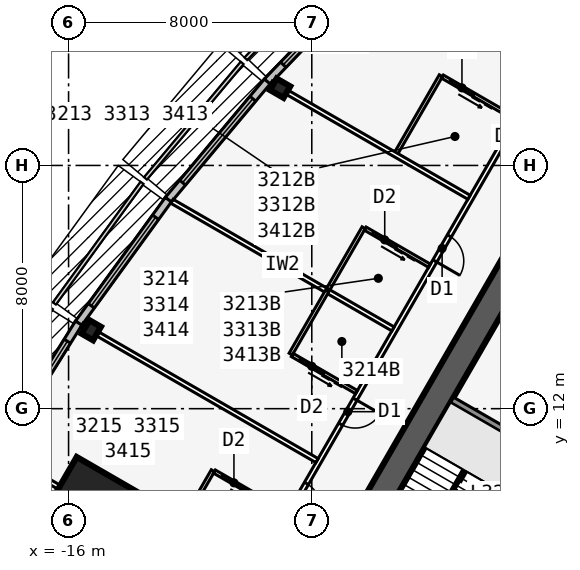
"""IFC4 building model, lengths in metres.
Left out: names, types, materials, properties, quantities, classifications, styles, units other than length and angle.
Written with IfcOpenShell. Run it as: python <this file> out.ifc"""

import sys

from ifc_helpers import new_model, si_unit, direction, frame, frame_2d, origin, origin_2d, place, context, subcontext, project, spatial, rectangle, i_section, extrude, element, fill, save


model = new_model("IFC4")
c1 = context("Model", 3, precision=1e-05, world=origin(), true_north=direction((0.0, 1.0)))
c2 = subcontext(c1, "Body", "Model", "MODEL_VIEW")
j1 = project(units=[si_unit("LENGTHUNIT", "METRE"), si_unit("PLANEANGLEUNIT", "RADIAN")], contexts=[c1])
p1 = place(None, origin())
s1 = spatial("IfcSite", under=j1, at=p1, CompositionType="ELEMENT")
p2 = place(p1, origin())
s2 = spatial("IfcBuilding", under=s1, at=p2, CompositionType="ELEMENT")
p3 = place(p2, frame((0.0, 0.0, 124.9)))
s3 = spatial("IfcBuildingStorey", under=s2, at=p3, CompositionType="ELEMENT", Elevation=124.9)
p4 = place(p3, frame((0.0, 19.052, 0.0), z_axis=(0.0, 0.0, 1.0), x_axis=(-0.499999749417, -0.866025548458, 0.0)))
e1 = element("IfcWall", 1, at=p4, inside=s3, PredefinedType="SHEAR", context=c2, shape_type="SweptSolid", body=[
    extrude(rectangle(XDim=33.0, YDim=0.9, at=frame_2d((16.5, 0.0))), origin(), (0.0, 0.0, 1.0), 3.4),
])
p5 = place(p4, frame((14.15, 0.0, 0.0)))
e2 = element("IfcOpeningElement", 2, at=p5, cuts=e1, PredefinedType="OPENING", context=c2, shape_type="SweptSolid", body=[
    extrude(rectangle(XDim=1.8, YDim=2.13, at=frame_2d((0.9, 1.065))), frame((0.0, 0.46, 0.0), z_axis=(0.0, -1.0, 0.0), x_axis=(1.0, 0.0, 0.0)), (0.0, 0.0, 1.0), 0.92),
])
p6 = place(p4, frame((12.6, 0.0, 0.0)))
e3 = element("IfcOpeningElement", 3, at=p6, cuts=e1, PredefinedType="OPENING", context=c2, shape_type="SweptSolid", body=[
    extrude(rectangle(XDim=1.0, YDim=2.13, at=frame_2d((0.5, 1.065))), frame((0.0, 0.46, 0.0), z_axis=(0.0, -1.0, 0.0), x_axis=(1.0, 0.0, 0.0)), (0.0, 0.0, 1.0), 0.92),
])
p7 = place(p3, frame((-0.062, 11.794, 0.0), z_axis=(0.0, 0.0, 1.0), x_axis=(-0.500006680225, -0.86602154692, 0.0)))
e4 = element("IfcWall", 4, at=p7, inside=s3, PredefinedType="SOLIDWALL", context=c2, shape_type="SweptSolid", body=[
    extrude(rectangle(XDim=7.733, YDim=0.25, at=frame_2d((3.866, 0.0))), origin(), (0.0, 0.0, 1.0), 3.235),
])
p8 = place(p3, frame((-0.679, 10.727, 0.0), z_axis=(0.0, 0.0, 1.0), x_axis=(-0.866022959057, 0.500004234368, 0.0)))
e5 = element("IfcWall", 5, at=p8, inside=s3, PredefinedType="SOLIDWALL", context=c2, shape_type="SweptSolid", body=[
    extrude(rectangle(XDim=3.125, YDim=0.2, at=frame_2d((1.562, 0.0))), origin(), (0.0, 0.0, 1.0), 3.235),
])
for number, where, z_axis, x_axis in (
    (6, (-9.041, 22.541, 0.0), (0.0, 0.0, 1.0), (-0.5, -0.866, 0.0)),
    (7, (-15.254, 14.58, 0.0), (0.0, 0.0, 1.0), (-0.866, 0.5, 0.0)),
):
    element("IfcColumn", number, at=place(p3, frame(where, z_axis=z_axis, x_axis=x_axis)), inside=s3, PredefinedType="COLUMN", context=c2, shape_type="SweptSolid", body=[
        extrude(i_section(OverallWidth=0.437, OverallDepth=0.513, WebThickness=0.061, FlangeThickness=0.097, at=origin_2d()), origin(), (0.0, 0.0, 1.0), 3.4),
    ])
p9 = place(p3, frame((-15.312, 8.84, 0.0), z_axis=(0.0, 0.0, 1.0), x_axis=(-0.866025403784, 0.5, 0.0)))
e8 = element("IfcColumn", 8, at=p9, inside=s3, PredefinedType="COLUMN", context=c2, shape_type="SweptSolid", body=[
    extrude(rectangle(XDim=2.3, YDim=2.3, at=origin_2d()), origin(), (0.0, 0.0, 1.0), 3.4),
])
p10 = place(p3, frame((-5.91, 26.472, 0.0), z_axis=(0.0, 0.0, 1.0), x_axis=(-0.691719937936, -0.722165858693, 0.0)))
e9 = element("IfcWall", 9, at=p10, inside=s3, PredefinedType="STANDARD", context=c2, shape_type="SweptSolid", body=[
    extrude(rectangle(XDim=5.148, YDim=0.25, at=frame_2d((2.574, 0.0))), origin(), (0.0, 0.0, 1.0), 3.235),
])
p11 = place(p10, frame((0.774, 0.0, 0.45)))
e10 = element("IfcOpeningElement", 10, at=p11, cuts=e9, PredefinedType="OPENING", context=c2, shape_type="SweptSolid", body=[
    extrude(rectangle(XDim=3.6, YDim=2.4, at=frame_2d((1.8, 1.2))), frame((0.0, 0.135, 0.0), z_axis=(0.0, -1.0, 0.0), x_axis=(1.0, 0.0, 0.0)), (0.0, 0.0, 1.0), 0.27),
])
p12 = place(p3, frame((-9.465, 22.76, 0.0), z_axis=(0.0, 0.0, 1.0), x_axis=(-0.641810386606, -0.766863369607, 0.0)))
e11 = element("IfcWall", 11, at=p12, inside=s3, PredefinedType="STANDARD", context=c2, shape_type="SweptSolid", body=[
    extrude(rectangle(XDim=5.076, YDim=0.25, at=frame_2d((2.538, 0.0))), origin(), (0.0, 0.0, 1.0), 3.235),
])
p13 = place(p12, frame((0.738, 0.0, 0.45)))
e12 = element("IfcOpeningElement", 12, at=p13, cuts=e11, PredefinedType="OPENING", context=c2, shape_type="SweptSolid", body=[
    extrude(rectangle(XDim=3.6, YDim=2.4, at=frame_2d((1.8, 1.2))), frame((0.0, 0.135, 0.0), z_axis=(0.0, -1.0, 0.0), x_axis=(1.0, 0.0, 0.0)), (0.0, 0.0, 1.0), 0.27),
])
p14 = place(p3, frame((-12.718, 18.875, 0.0), z_axis=(0.0, 0.0, 1.0), x_axis=(-0.587669188412, -0.809101307001, 0.0)))
e13 = element("IfcWall", 13, at=p14, inside=s3, PredefinedType="STANDARD", context=c2, shape_type="SweptSolid", body=[
    extrude(rectangle(XDim=5.028, YDim=0.25, at=frame_2d((2.514, 0.0))), origin(), (0.0, 0.0, 1.0), 3.235),
])
p15 = place(p14, frame((0.714, 0.0, 0.45)))
e14 = element("IfcOpeningElement", 14, at=p15, cuts=e13, PredefinedType="OPENING", context=c2, shape_type="SweptSolid", body=[
    extrude(rectangle(XDim=3.6, YDim=2.4, at=frame_2d((1.8, 1.2))), frame((0.0, 0.135, 0.0), z_axis=(0.0, -1.0, 0.0), x_axis=(1.0, 0.0, 0.0)), (0.0, 0.0, 1.0), 0.27),
])
p16 = place(p3, frame((-15.667, 14.814, 0.0), z_axis=(0.0, 0.0, 1.0), x_axis=(-0.529990167382, -0.84800378683, 0.0)))
e15 = element("IfcWall", 15, at=p16, inside=s3, PredefinedType="STANDARD", context=c2, shape_type="SweptSolid", body=[
    extrude(rectangle(XDim=5.003, YDim=0.25, at=frame_2d((2.501, 0.0))), origin(), (0.0, 0.0, 1.0), 3.235),
])
p17 = place(p16, frame((0.701, 0.0, 0.45)))
e16 = element("IfcOpeningElement", 16, at=p17, cuts=e15, PredefinedType="OPENING", context=c2, shape_type="SweptSolid", body=[
    extrude(rectangle(XDim=3.6, YDim=2.4, at=frame_2d((1.8, 1.2))), frame((0.0, 0.135, 0.0), z_axis=(0.0, -1.0, 0.0), x_axis=(1.0, 0.0, 0.0)), (0.0, 0.0, 1.0), 0.27),
])
p18 = place(p3, frame((-0.5, 22.836, 0.0), z_axis=(0.0, 0.0, 1.0), x_axis=(-0.500001677587, -0.866024435227, 0.0)))
e17 = element("IfcWall", 17, at=p18, inside=s3, PredefinedType="PARTITIONING", context=c2, shape_type="SweptSolid", body=[
    extrude(rectangle(XDim=39.054, YDim=0.15, at=frame_2d((19.527, 0.0))), origin(), (0.0, 0.0, 1.0), 3.235),
])
p19 = place(p18, frame((0.352, 0.0, 0.0)))
e18 = element("IfcOpeningElement", 18, at=p19, cuts=e17, PredefinedType="OPENING", context=c2, shape_type="SweptSolid", body=[
    extrude(rectangle(XDim=0.95, YDim=2.13, at=frame_2d((0.475, 1.065))), frame((0.0, 0.085, 0.0), z_axis=(0.0, -1.0, 0.0), x_axis=(1.0, 0.0, 0.0)), (0.0, 0.0, 1.0), 0.17),
])
p20 = place(p18, frame((5.952, 0.0, 0.0)))
e19 = element("IfcOpeningElement", 19, at=p20, cuts=e17, PredefinedType="OPENING", context=c2, shape_type="SweptSolid", body=[
    extrude(rectangle(XDim=0.95, YDim=2.13, at=frame_2d((0.475, 1.065))), frame((0.0, 0.085, 0.0), z_axis=(0.0, -1.0, 0.0), x_axis=(1.0, 0.0, 0.0)), (0.0, 0.0, 1.0), 0.17),
])
p21 = place(p18, frame((12.152, 0.0, 0.0)))
e20 = element("IfcOpeningElement", 20, at=p21, cuts=e17, PredefinedType="OPENING", context=c2, shape_type="SweptSolid", body=[
    extrude(rectangle(XDim=0.95, YDim=2.13, at=frame_2d((0.475, 1.065))), frame((0.0, 0.085, 0.0), z_axis=(0.0, -1.0, 0.0), x_axis=(1.0, 0.0, 0.0)), (0.0, 0.0, 1.0), 0.17),
])
p22 = place(p18, frame((15.352, 0.0, 0.0)))
e21 = element("IfcOpeningElement", 21, at=p22, cuts=e17, PredefinedType="OPENING", context=c2, shape_type="SweptSolid", body=[
    extrude(rectangle(XDim=0.95, YDim=2.13, at=frame_2d((0.475, 1.065))), frame((0.0, 0.085, 0.0), z_axis=(0.0, -1.0, 0.0), x_axis=(1.0, 0.0, 0.0)), (0.0, 0.0, 1.0), 0.17),
])
p23 = place(p18, frame((22.152, 0.0, 0.0)))
e22 = element("IfcOpeningElement", 22, at=p23, cuts=e17, PredefinedType="OPENING", context=c2, shape_type="SweptSolid", body=[
    extrude(rectangle(XDim=0.95, YDim=2.13, at=frame_2d((0.475, 1.065))), frame((0.0, 0.085, 0.0), z_axis=(0.0, -1.0, 0.0), x_axis=(1.0, 0.0, 0.0)), (0.0, 0.0, 1.0), 0.17),
])
p24 = place(p18, frame((30.352, 0.0, 0.0)))
e23 = element("IfcOpeningElement", 23, at=p24, cuts=e17, PredefinedType="OPENING", context=c2, shape_type="SweptSolid", body=[
    extrude(rectangle(XDim=0.95, YDim=2.13, at=frame_2d((0.475, 1.065))), frame((0.0, 0.085, 0.0), z_axis=(0.0, -1.0, 0.0), x_axis=(1.0, 0.0, 0.0)), (0.0, 0.0, 1.0), 0.17),
])
p25 = place(p18, frame((37.752, 0.0, 0.0)))
e24 = element("IfcOpeningElement", 24, at=p25, cuts=e17, PredefinedType="OPENING", context=c2, shape_type="SweptSolid", body=[
    extrude(rectangle(XDim=0.95, YDim=2.13, at=frame_2d((0.475, 1.065))), frame((0.0, 0.085, 0.0), z_axis=(0.0, -1.0, 0.0), x_axis=(1.0, 0.0, 0.0)), (0.0, 0.0, 1.0), 0.17),
])
p26 = place(p3, frame((-2.829, 18.954, 0.0), z_axis=(0.0, 0.0, 1.0), x_axis=(-0.866015739374, 0.500016738876, 0.0)))
e25 = element("IfcWall", 25, at=p26, inside=s3, PredefinedType="PARTITIONING", context=c2, shape_type="SweptSolid", body=[
    extrude(rectangle(XDim=7.516, YDim=0.15, at=frame_2d((3.758, 0.0))), origin(), (0.0, 0.0, 1.0), 2.389),
])
p27 = place(p3, frame((-5.329, 14.623, 0.0), z_axis=(0.0, 0.0, 1.0), x_axis=(-0.866011723728, 0.500023693804, 0.0)))
e26 = element("IfcWall", 26, at=p27, inside=s3, PredefinedType="PARTITIONING", context=c2, shape_type="SweptSolid", body=[
    extrude(rectangle(XDim=8.395, YDim=0.15, at=frame_2d((4.198, 0.0))), origin(), (0.0, 0.0, 1.0), 2.389),
])
p28 = place(p3, frame((-7.829, 10.293, 0.0), z_axis=(0.0, 0.0, 1.0), x_axis=(-0.866027015393, 0.499997208602, 0.0)))
e27 = element("IfcWall", 27, at=p28, inside=s3, PredefinedType="PARTITIONING", context=c2, shape_type="SweptSolid", body=[
    extrude(rectangle(XDim=8.922, YDim=0.15, at=frame_2d((4.461, 0.0))), origin(), (0.0, 0.0, 1.0), 2.389),
])
p29 = place(p3, frame((-10.329, 5.963, 0.0), z_axis=(0.0, 0.0, 1.0), x_axis=(-0.866025170687, 0.500000403736, 0.0)))
e28 = element("IfcWall", 28, at=p29, inside=s3, PredefinedType="PARTITIONING", context=c2, shape_type="SweptSolid", body=[
    extrude(rectangle(XDim=9.099, YDim=0.15, at=frame_2d((4.549, 0.0))), origin(), (0.0, 0.0, 1.0), 2.389),
])
p30 = place(p3, frame((-3.753, 22.952, 0.0), z_axis=(0.0, 0.0, 1.0), x_axis=(-0.499990139034, -0.866031096941, 0.0)))
e29 = element("IfcWall", 29, at=p30, inside=s3, PredefinedType="PLUMBINGWALL", context=c2, shape_type="SweptSolid", body=[
    extrude(rectangle(XDim=3.0, YDim=0.12, at=frame_2d((1.5, 0.0))), origin(), (0.0, 0.0, 1.0), 3.235),
])
p31 = place(p3, frame((-1.329, 21.552, 0.0), z_axis=(0.0, 0.0, 1.0), x_axis=(-0.865997131366, 0.500048966069, 0.0)))
e30 = element("IfcWall", 30, at=p31, inside=s3, PredefinedType="PLUMBINGWALL", context=c2, shape_type="SweptSolid", body=[
    extrude(rectangle(XDim=2.74, YDim=0.12, at=frame_2d((1.37, 0.0))), origin(), (0.0, 0.0, 1.0), 3.235),
])
p32 = place(p31, frame((1.55, 0.0, 0.0)))
e31 = element("IfcOpeningElement", 31, at=p32, cuts=e30, PredefinedType="OPENING", context=c2, shape_type="SweptSolid", body=[
    extrude(rectangle(XDim=0.9, YDim=2.13, at=frame_2d((0.45, 1.065))), frame((0.0, 0.07, 0.0), z_axis=(0.0, -1.0, 0.0), x_axis=(1.0, 0.0, 0.0)), (0.0, 0.0, 1.0), 0.14),
])
p33 = place(p3, frame((-6.293, 17.952, 0.0), z_axis=(0.0, 0.0, 1.0), x_axis=(-0.499957262057, -0.866050077142, 0.0)))
e32 = element("IfcWall", 32, at=p33, inside=s3, PredefinedType="PLUMBINGWALL", context=c2, shape_type="SweptSolid", body=[
    extrude(rectangle(XDim=2.4, YDim=0.12, at=frame_2d((1.2, 0.0))), origin(), (0.0, 0.0, 1.0), 3.235),
])
p34 = place(p3, frame((-4.128, 16.702, 0.0), z_axis=(0.0, 0.0, 1.0), x_axis=(-0.866048967903, 0.499959183527, 0.0)))
e33 = element("IfcWall", 33, at=p34, inside=s3, PredefinedType="PLUMBINGWALL", context=c2, shape_type="SweptSolid", body=[
    extrude(rectangle(XDim=2.44, YDim=0.12, at=frame_2d((1.22, 0.0))), origin(), (0.0, 0.0, 1.0), 3.235),
])
p35 = place(p34, frame((1.25, 0.0, 0.0)))
e34 = element("IfcOpeningElement", 34, at=p35, cuts=e33, PredefinedType="OPENING", context=c2, shape_type="SweptSolid", body=[
    extrude(rectangle(XDim=0.9, YDim=2.13, at=frame_2d((0.45, 1.065))), frame((0.0, 0.07, 0.0), z_axis=(0.0, -1.0, 0.0), x_axis=(1.0, 0.0, 0.0)), (0.0, 0.0, 1.0), 0.14),
])
p36 = place(p3, frame((-7.493, 15.873, 0.0), z_axis=(0.0, 0.0, 1.0), x_axis=(-0.500077600433, -0.865980596518, 0.0)))
e35 = element("IfcWall", 35, at=p36, inside=s3, PredefinedType="PLUMBINGWALL", context=c2, shape_type="SweptSolid", body=[
    extrude(rectangle(XDim=2.4, YDim=0.12, at=frame_2d((1.2, 0.0))), origin(), (0.0, 0.0, 1.0), 3.235),
])
p37 = place(p3, frame((-6.529, 12.545, 0.0), z_axis=(0.0, 0.0, 1.0), x_axis=(-0.866023955769, 0.500002508028, 0.0)))
e36 = element("IfcWall", 36, at=p37, inside=s3, PredefinedType="PLUMBINGWALL", context=c2, shape_type="SweptSolid", body=[
    extrude(rectangle(XDim=2.44, YDim=0.12, at=frame_2d((1.22, 0.0))), origin(), (0.0, 0.0, 1.0), 3.235),
])
p38 = place(p37, frame((1.25, 0.0, 0.0)))
e37 = element("IfcOpeningElement", 37, at=p38, cuts=e36, PredefinedType="OPENING", context=c2, shape_type="SweptSolid", body=[
    extrude(rectangle(XDim=0.9, YDim=2.13, at=frame_2d((0.45, 1.065))), frame((0.0, 0.07, 0.0), z_axis=(0.0, -1.0, 0.0), x_axis=(1.0, 0.0, 0.0)), (0.0, 0.0, 1.0), 0.14),
])
p39 = place(p3, frame((-11.253, 9.961, 0.0), z_axis=(0.0, 0.0, 1.0), x_axis=(-0.499990139034, -0.866031096941, 0.0)))
e38 = element("IfcWall", 38, at=p39, inside=s3, PredefinedType="PLUMBINGWALL", context=c2, shape_type="SweptSolid", body=[
    extrude(rectangle(XDim=3.0, YDim=0.12, at=frame_2d((1.5, 0.0))), origin(), (0.0, 0.0, 1.0), 3.235),
])
p40 = place(p3, frame((-8.829, 8.561, 0.0), z_axis=(0.0, 0.0, 1.0), x_axis=(-0.866035715982, 0.499982138324, 0.0)))
e39 = element("IfcWall", 39, at=p40, inside=s3, PredefinedType="PLUMBINGWALL", context=c2, shape_type="SweptSolid", body=[
    extrude(rectangle(XDim=2.74, YDim=0.12, at=frame_2d((1.37, 0.0))), origin(), (0.0, 0.0, 1.0), 3.235),
])
p41 = place(p40, frame((1.55, 0.0, 0.0)))
e40 = element("IfcOpeningElement", 40, at=p41, cuts=e39, PredefinedType="OPENING", context=c2, shape_type="SweptSolid", body=[
    extrude(rectangle(XDim=0.9, YDim=2.13, at=frame_2d((0.45, 1.065))), frame((0.0, 0.07, 0.0), z_axis=(0.0, -1.0, 0.0), x_axis=(1.0, 0.0, 0.0)), (0.0, 0.0, 1.0), 0.14),
])
p42 = place(p3, frame((-2.988, 9.978, 0.0), z_axis=(0.0, 0.0, 1.0), x_axis=(-0.499992232847, -0.866029888106, 0.0)))
e41 = element("IfcWall", 41, at=p42, inside=s3, PredefinedType="SOLIDWALL", context=c2, shape_type="SweptSolid", body=[
    extrude(rectangle(XDim=2.794, YDim=0.1, at=frame_2d((1.397, 0.0))), origin(), (0.0, 0.0, 1.0), 3.4),
])
p43 = place(p11, origin())
e42 = element("IfcWindow", 42, at=p43, inside=s3, PartitioningType="SINGLE_PANEL", PredefinedType="WINDOW", context=c2, shape_type="SweptSolid", body=[
    extrude(rectangle(XDim=3.6, YDim=2.4, at=frame_2d((1.8, 1.2))), frame((0.0, 0.03, 0.0), z_axis=(0.0, -1.0, 0.0), x_axis=(1.0, 0.0, 0.0)), (0.0, 0.0, 1.0), 0.06),
])
fill(e10, e42)
p44 = place(p13, origin())
e43 = element("IfcWindow", 43, at=p44, inside=s3, PartitioningType="SINGLE_PANEL", PredefinedType="WINDOW", context=c2, shape_type="SweptSolid", body=[
    extrude(rectangle(XDim=3.6, YDim=2.4, at=frame_2d((1.8, 1.2))), frame((0.0, 0.03, 0.0), z_axis=(0.0, -1.0, 0.0), x_axis=(1.0, 0.0, 0.0)), (0.0, 0.0, 1.0), 0.06),
])
fill(e12, e43)
p45 = place(p15, origin())
e44 = element("IfcWindow", 44, at=p45, inside=s3, PartitioningType="SINGLE_PANEL", PredefinedType="WINDOW", context=c2, shape_type="SweptSolid", body=[
    extrude(rectangle(XDim=3.6, YDim=2.4, at=frame_2d((1.8, 1.2))), frame((0.0, 0.03, 0.0), z_axis=(0.0, -1.0, 0.0), x_axis=(1.0, 0.0, 0.0)), (0.0, 0.0, 1.0), 0.06),
])
fill(e14, e44)
p46 = place(p17, origin())
e45 = element("IfcWindow", 45, at=p46, inside=s3, PartitioningType="SINGLE_PANEL", PredefinedType="WINDOW", context=c2, shape_type="SweptSolid", body=[
    extrude(rectangle(XDim=3.6, YDim=2.4, at=frame_2d((1.8, 1.2))), frame((0.0, 0.03, 0.0), z_axis=(0.0, -1.0, 0.0), x_axis=(1.0, 0.0, 0.0)), (0.0, 0.0, 1.0), 0.06),
])
fill(e16, e45)
p47 = place(p32, origin())
e46 = element("IfcDoor", 46, at=p47, inside=s3, OperationType="SLIDING_TO_LEFT", PredefinedType="DOOR", context=c2, shape_type="SweptSolid", body=[
    extrude(rectangle(XDim=0.9, YDim=2.13, at=frame_2d((0.45, 1.065))), frame((0.0, 0.025, 0.0), z_axis=(0.0, -1.0, 0.0), x_axis=(1.0, 0.0, 0.0)), (0.0, 0.0, 1.0), 0.05),
])
fill(e31, e46)
p48 = place(p35, origin())
e47 = element("IfcDoor", 47, at=p48, inside=s3, OperationType="SLIDING_TO_LEFT", PredefinedType="DOOR", context=c2, shape_type="SweptSolid", body=[
    extrude(rectangle(XDim=0.9, YDim=2.13, at=frame_2d((0.45, 1.065))), frame((0.0, 0.025, 0.0), z_axis=(0.0, -1.0, 0.0), x_axis=(1.0, 0.0, 0.0)), (0.0, 0.0, 1.0), 0.05),
])
fill(e34, e47)
p49 = place(p20, origin())
e48 = element("IfcDoor", 48, at=p49, inside=s3, OperationType="SINGLE_SWING_RIGHT", PredefinedType="DOOR", context=c2, shape_type="SweptSolid", body=[
    extrude(rectangle(XDim=0.95, YDim=2.13, at=frame_2d((0.475, 1.065))), frame((0.0, 0.025, 0.0), z_axis=(0.0, -1.0, 0.0), x_axis=(1.0, 0.0, 0.0)), (0.0, 0.0, 1.0), 0.05),
])
fill(e19, e48)
p50 = place(p38, origin())
e49 = element("IfcDoor", 49, at=p50, inside=s3, OperationType="SLIDING_TO_LEFT", PredefinedType="DOOR", context=c2, shape_type="SweptSolid", body=[
    extrude(rectangle(XDim=0.9, YDim=2.13, at=frame_2d((0.45, 1.065))), frame((0.0, 0.025, 0.0), z_axis=(0.0, -1.0, 0.0), x_axis=(1.0, 0.0, 0.0)), (0.0, 0.0, 1.0), 0.05),
])
fill(e37, e49)
p51 = place(p21, origin())
e50 = element("IfcDoor", 50, at=p51, inside=s3, OperationType="SINGLE_SWING_LEFT", PredefinedType="DOOR", context=c2, shape_type="SweptSolid", body=[
    extrude(rectangle(XDim=0.95, YDim=2.13, at=frame_2d((0.475, 1.065))), frame((0.0, 0.025, 0.0), z_axis=(0.0, -1.0, 0.0), x_axis=(1.0, 0.0, 0.0)), (0.0, 0.0, 1.0), 0.05),
])
fill(e20, e50)
p52 = place(p41, origin())
e51 = element("IfcDoor", 51, at=p52, inside=s3, OperationType="SLIDING_TO_LEFT", PredefinedType="DOOR", context=c2, shape_type="SweptSolid", body=[
    extrude(rectangle(XDim=0.9, YDim=2.13, at=frame_2d((0.45, 1.065))), frame((0.0, 0.025, 0.0), z_axis=(0.0, -1.0, 0.0), x_axis=(1.0, 0.0, 0.0)), (0.0, 0.0, 1.0), 0.05),
])
fill(e40, e51)
p53 = place(p22, origin())
e52 = element("IfcDoor", 52, at=p53, inside=s3, OperationType="SINGLE_SWING_RIGHT", PredefinedType="DOOR", context=c2, shape_type="SweptSolid", body=[
    extrude(rectangle(XDim=0.95, YDim=2.13, at=frame_2d((0.475, 1.065))), frame((0.0, 0.025, 0.0), z_axis=(0.0, -1.0, 0.0), x_axis=(1.0, 0.0, 0.0)), (0.0, 0.0, 1.0), 0.05),
])
fill(e21, e52)
save(model, sys.argv[1])
